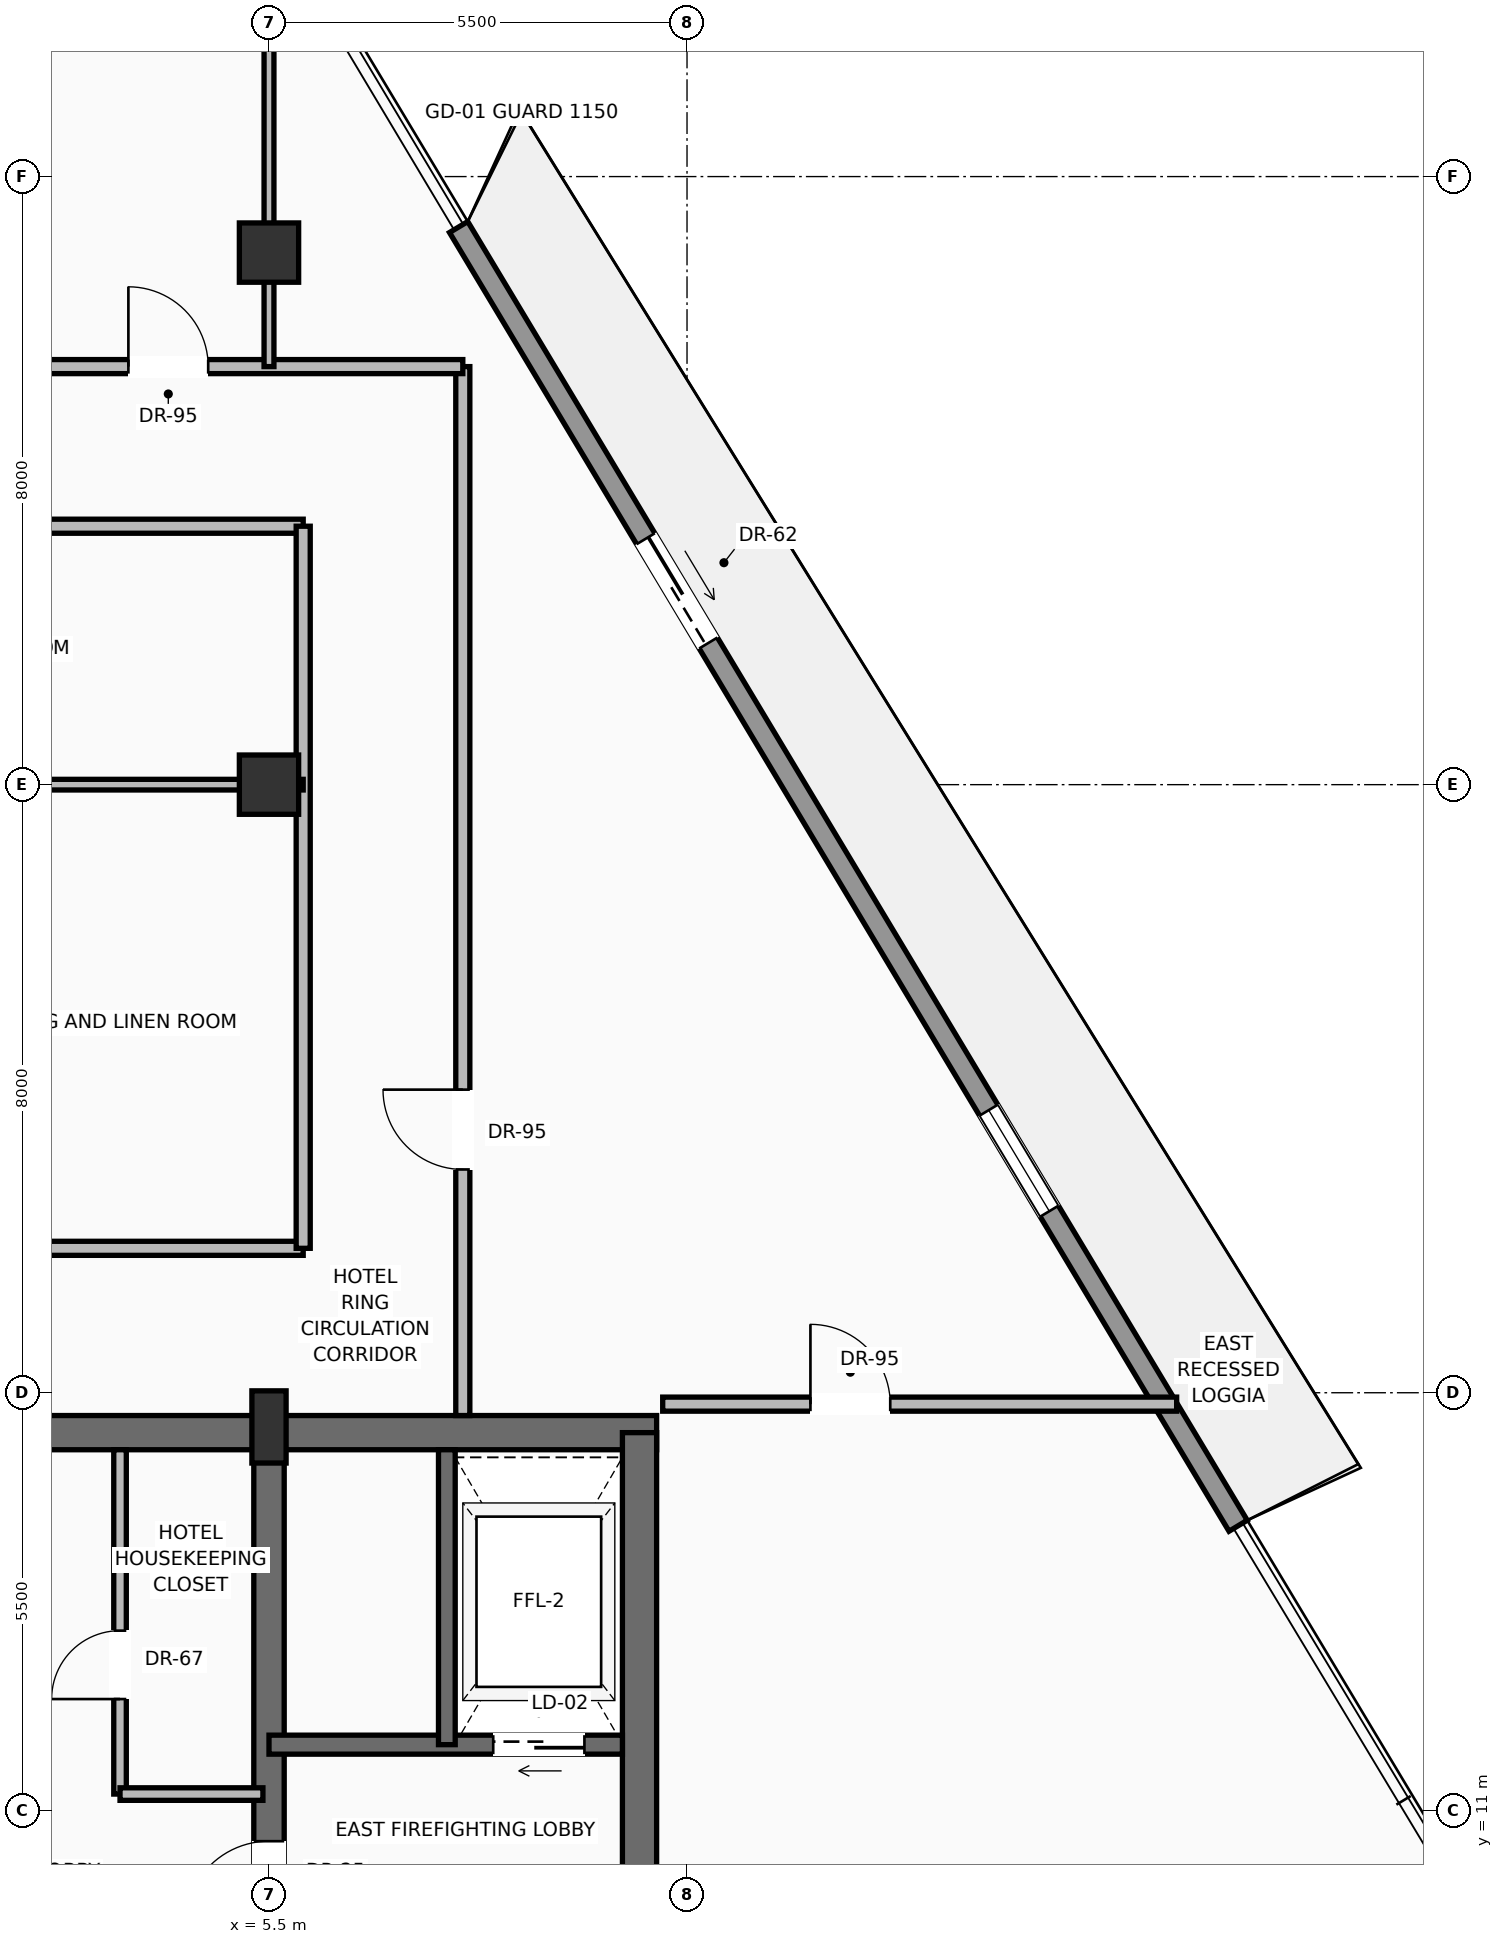
"""IFC4 building model, lengths in metres.
Left out: names, types, materials, properties, quantities, classifications, styles, units other than length and angle.
Written with IfcOpenShell. Run it as: python <this file> out.ifc"""

import sys

from ifc_helpers import new_model, si_unit, direction, frame, frame_2d, origin, origin_2d, place, context, subcontext, project, spatial, rectangle, extrude, source, transform, mapped, element, fill, save


model = new_model("IFC4")
c1 = context("Model", 3, precision=1e-05, world=origin(), true_north=direction((0.0, 1.0)))
c2 = subcontext(c1, "Body", "Model", "MODEL_VIEW")
j1 = project(units=[si_unit("LENGTHUNIT", "METRE"), si_unit("PLANEANGLEUNIT", "RADIAN")], contexts=[c1])
p1 = place(None, origin())
s1 = spatial("IfcSite", under=j1, at=p1, CompositionType="ELEMENT")
p2 = place(p1, origin())
s2 = spatial("IfcBuilding", under=s1, at=p2, CompositionType="ELEMENT")
p3 = place(p2, frame((0.0, 0.0, 266.1)))
s3 = spatial("IfcBuildingStorey", under=s2, at=p3, CompositionType="ELEMENT", Elevation=266.1)
p4 = place(p3, frame((-10.6, 15.975, 0.0), z_axis=(0.0, 0.0, 1.0), x_axis=(1.0, 0.0, 0.0)))
e1 = element("IfcWall", 1, at=p4, inside=s3, PredefinedType="SHEAR", context=c2, shape_type="SweptSolid", body=[
    extrude(rectangle(XDim=21.2, YDim=0.45, at=frame_2d((10.6, 0.0))), origin(), (0.0, 0.0, 1.0), 3.24),
])
p5 = place(p4, frame((3.17, 0.0, 0.0)))
e2 = element("IfcOpeningElement", 2, at=p5, cuts=e1, PredefinedType="OPENING", context=c2, shape_type="SweptSolid", body=[
    extrude(rectangle(XDim=1.3, YDim=2.3, at=frame_2d((0.65, 1.15))), frame((0.0, 0.235, 0.0), z_axis=(0.0, -1.0, 0.0), x_axis=(1.0, 0.0, 0.0)), (0.0, 0.0, 1.0), 0.47),
])
p6 = place(p4, frame((9.6, 0.0, 0.0)))
e3 = element("IfcOpeningElement", 3, at=p6, cuts=e1, PredefinedType="OPENING", context=c2, shape_type="SweptSolid", body=[
    extrude(rectangle(XDim=2.0, YDim=2.4, at=frame_2d((1.0, 1.2))), frame((0.0, 0.235, 0.0), z_axis=(0.0, -1.0, 0.0), x_axis=(1.0, 0.0, 0.0)), (0.0, 0.0, 1.0), 0.47),
])
p7 = place(p3, frame((10.375, 0.625, 0.0), z_axis=(0.0, 0.0, 1.0), x_axis=(0.0, 1.0, 0.0)))
e4 = element("IfcWall", 4, at=p7, inside=s3, PredefinedType="SHEAR", context=c2, shape_type="SweptSolid", body=[
    extrude(rectangle(XDim=15.35, YDim=0.45, at=frame_2d((7.675, 0.0))), origin(), (0.0, 0.0, 1.0), 3.24),
])
p8 = place(p3, frame((5.5, 0.625, 0.0), z_axis=(0.0, 0.0, 1.0), x_axis=(0.0, 1.0, 0.0)))
e5 = element("IfcWall", 5, at=p8, inside=s3, PredefinedType="SHEAR", context=c2, shape_type="SweptSolid", body=[
    extrude(rectangle(XDim=15.35, YDim=0.4, at=frame_2d((7.675, 0.0))), origin(), (0.0, 0.0, 1.0), 3.24),
])
p9 = place(p8, frame((8.875, 0.0, 0.0)))
e6 = element("IfcOpeningElement", 6, at=p9, cuts=e5, PredefinedType="OPENING", context=c2, shape_type="SweptSolid", body=[
    extrude(rectangle(XDim=1.1, YDim=2.2, at=frame_2d((0.55, 1.1))), frame((0.0, 0.21, 0.0), z_axis=(0.0, -1.0, 0.0), x_axis=(1.0, 0.0, 0.0)), (0.0, 0.0, 1.0), 0.42),
])
m1 = source(origin(), c2, "Body", "SweptSolid", [
    extrude(rectangle(XDim=0.45, YDim=0.95, at=origin_2d()), origin(), (0.0, 0.0, 1.0), 3.45),
])
p10 = place(p3, frame((5.5, 16.05, 0.0), z_axis=(0.0, 0.0, 1.0), x_axis=(1.0, 0.0, 0.0)))
e7 = element("IfcColumn", 7, at=p10, inside=s3, PredefinedType="PILASTER", context=c2, shape_type="MappedRepresentation", body=[
    mapped(m1, transform((0.0, 0.0, 0.0), scale=1.0)),
])
m2 = source(origin(), c2, "Body", "SweptSolid", [
    extrude(rectangle(XDim=0.78, YDim=0.78, at=origin_2d()), origin(), (0.0, 0.0, 1.0), 3.45),
])
for number, where, z_axis, x_axis in (
    (8, (5.5, 24.5, 0.0), (0.0, 0.0, 1.0), (1.0, 0.0, 0.0)),
    (9, (5.5, 31.5, 0.0), (0.0, 0.0, 1.0), (1.0, 0.0, 0.0)),
):
    element("IfcColumn", number, at=place(p3, frame(where, z_axis=z_axis, x_axis=x_axis)), inside=s3, PredefinedType="COLUMN", context=c2, shape_type="MappedRepresentation", body=[
        mapped(m2, transform((0.0, 0.0, 0.0), scale=1.0)),
    ])
p11 = place(p3, frame((7.995, 31.836, 0.0), z_axis=(0.0, 0.0, 1.0), x_axis=(0.514643481436, -0.8574042728, 0.0)))
e10 = element("IfcWall", 10, at=p11, inside=s3, PredefinedType="SOLIDWALL", context=c2, shape_type="SweptSolid", body=[
    extrude(rectangle(XDim=19.928, YDim=0.28, at=frame_2d((9.964, 0.0))), origin(), (0.0, 0.0, 1.0), 2.82),
])
p12 = place(p11, frame((4.783, 0.0, 0.0)))
e11 = element("IfcOpeningElement", 11, at=p12, cuts=e10, PredefinedType="OPENING", context=c2, shape_type="SweptSolid", body=[
    extrude(rectangle(XDim=1.6, YDim=2.35, at=frame_2d((0.8, 1.175))), frame((0.0, 0.15, 0.0), z_axis=(0.0, -1.0, 0.0), x_axis=(1.0, 0.0, 0.0)), (0.0, 0.0, 1.0), 0.3),
])
p13 = place(p11, frame((13.551, 0.0, 0.9)))
e12 = element("IfcOpeningElement", 12, at=p13, cuts=e10, PredefinedType="OPENING", context=c2, shape_type="SweptSolid", body=[
    extrude(rectangle(XDim=1.55, YDim=1.75, at=frame_2d((0.775, 0.875))), frame((0.0, 0.15, 0.0), z_axis=(0.0, -1.0, 0.0), x_axis=(1.0, 0.0, 0.0)), (0.0, 0.0, 1.0), 0.3),
])
p14 = place(p3, frame((10.15, 11.87, 0.0), z_axis=(0.0, 0.0, 1.0), x_axis=(-1.0, 0.0, 0.0)))
e13 = element("IfcWall", 13, at=p14, inside=s3, PredefinedType="SOLIDWALL", context=c2, shape_type="SweptSolid", body=[
    extrude(rectangle(XDim=4.65, YDim=0.25, at=frame_2d((2.325, 0.0))), origin(), (0.0, 0.0, 1.0), 3.24),
])
p15 = place(p14, frame((0.5, 0.0, 0.0)))
e14 = element("IfcOpeningElement", 14, at=p15, cuts=e13, PredefinedType="OPENING", context=c2, shape_type="SweptSolid", body=[
    extrude(rectangle(XDim=1.2, YDim=2.25, at=frame_2d((0.6, 1.125))), frame((0.0, 0.135, 0.0), z_axis=(0.0, -1.0, 0.0), x_axis=(1.0, 0.0, 0.0)), (0.0, 0.0, 1.0), 0.27),
])
p16 = place(p3, frame((7.84, 11.87, 0.0), z_axis=(0.0, 0.0, 1.0), x_axis=(0.0, 1.0, 0.0)))
e15 = element("IfcWall", 15, at=p16, inside=s3, PredefinedType="SOLIDWALL", context=c2, shape_type="SweptSolid", body=[
    extrude(rectangle(XDim=3.88, YDim=0.22, at=frame_2d((1.94, 0.0))), origin(), (0.0, 0.0, 1.0), 3.24),
])
p17 = place(p3, frame((3.54, 11.22, 0.0), z_axis=(0.0, 0.0, 1.0), x_axis=(0.0, 1.0, 0.0)))
e16 = element("IfcWall", 16, at=p17, inside=s3, PredefinedType="PARTITIONING", context=c2, shape_type="SweptSolid", body=[
    extrude(rectangle(XDim=4.53, YDim=0.165, at=frame_2d((2.265, 0.0))), origin(), (0.0, 0.0, 1.0), 3.232),
])
p18 = place(p17, frame((1.25, 0.0, 0.0)))
e17 = element("IfcOpeningElement", 17, at=p18, cuts=e16, PredefinedType="OPENING", context=c2, shape_type="SweptSolid", body=[
    extrude(rectangle(XDim=0.9, YDim=2.1, at=frame_2d((0.45, 1.05))), frame((0.0, 0.093, 0.0), z_axis=(0.0, -1.0, 0.0), x_axis=(1.0, 0.0, 0.0)), (0.0, 0.0, 1.0), 0.185),
])
p19 = place(p3, frame((3.54, 11.22, 0.0), z_axis=(0.0, 0.0, 1.0), x_axis=(1.0, 0.0, 0.0)))
e18 = element("IfcWall", 18, at=p19, inside=s3, PredefinedType="PARTITIONING", context=c2, shape_type="SweptSolid", body=[
    extrude(rectangle(XDim=1.88, YDim=0.165, at=frame_2d((0.94, 0.0))), origin(), (0.0, 0.0, 1.0), 3.232),
])
p20 = place(p3, frame((-6.5, 18.4, 0.0), z_axis=(0.0, 0.0, 1.0), x_axis=(1.0, 0.0, 0.0)))
e19 = element("IfcWall", 19, at=p20, inside=s3, PredefinedType="PARTITIONING", context=c2, shape_type="SweptSolid", body=[
    extrude(rectangle(XDim=12.45, YDim=0.185, at=frame_2d((6.225, 0.0))), origin(), (0.0, 0.0, 1.0), 3.232),
])
p21 = place(p20, frame((5.75, 0.0, 0.0)))
e20 = element("IfcOpeningElement", 20, at=p21, cuts=e19, PredefinedType="OPENING", context=c2, shape_type="SweptSolid", body=[
    extrude(rectangle(XDim=0.95, YDim=2.2, at=frame_2d((0.475, 1.1))), frame((0.0, 0.103, 0.0), z_axis=(0.0, -1.0, 0.0), x_axis=(1.0, 0.0, 0.0)), (0.0, 0.0, 1.0), 0.205),
])
p22 = place(p3, frame((-6.5, 27.9, 0.0), z_axis=(0.0, 0.0, 1.0), x_axis=(1.0, 0.0, 0.0)))
e21 = element("IfcWall", 21, at=p22, inside=s3, PredefinedType="PARTITIONING", context=c2, shape_type="SweptSolid", body=[
    extrude(rectangle(XDim=12.45, YDim=0.185, at=frame_2d((6.225, 0.0))), origin(), (0.0, 0.0, 1.0), 2.885),
])
p23 = place(p22, frame((5.75, 0.0, 0.0)))
e22 = element("IfcOpeningElement", 22, at=p23, cuts=e21, PredefinedType="OPENING", context=c2, shape_type="SweptSolid", body=[
    extrude(rectangle(XDim=0.95, YDim=2.2, at=frame_2d((0.475, 1.1))), frame((0.0, 0.103, 0.0), z_axis=(0.0, -1.0, 0.0), x_axis=(1.0, 0.0, 0.0)), (0.0, 0.0, 1.0), 0.205),
])
p24 = place(p3, frame((5.95, 18.4, 0.0), z_axis=(0.0, 0.0, 1.0), x_axis=(0.0, 1.0, 0.0)))
e23 = element("IfcWall", 23, at=p24, inside=s3, PredefinedType="PARTITIONING", context=c2, shape_type="SweptSolid", body=[
    extrude(rectangle(XDim=9.5, YDim=0.185, at=frame_2d((4.75, 0.0))), origin(), (0.0, 0.0, 1.0), 3.232),
])
p25 = place(p3, frame((8.05, 16.2, 0.0), z_axis=(0.0, 0.0, 1.0), x_axis=(0.0, 1.0, 0.0)))
e24 = element("IfcWall", 24, at=p25, inside=s3, PredefinedType="PARTITIONING", context=c2, shape_type="SweptSolid", body=[
    extrude(rectangle(XDim=13.8, YDim=0.185, at=frame_2d((6.9, 0.0))), origin(), (0.0, 0.0, 1.0), 3.232),
])
p26 = place(p25, frame((3.238, 0.0, 0.0)))
e25 = element("IfcOpeningElement", 25, at=p26, cuts=e24, PredefinedType="OPENING", context=c2, shape_type="SweptSolid", body=[
    extrude(rectangle(XDim=1.05, YDim=2.25, at=frame_2d((0.525, 1.125))), frame((0.0, 0.103, 0.0), z_axis=(0.0, -1.0, 0.0), x_axis=(1.0, 0.0, 0.0)), (0.0, 0.0, 1.0), 0.205),
])
p27 = place(p3, frame((-8.6, 30.0, 0.0), z_axis=(0.0, 0.0, 1.0), x_axis=(1.0, 0.0, 0.0)))
e26 = element("IfcWall", 26, at=p27, inside=s3, PredefinedType="PARTITIONING", context=c2, shape_type="SweptSolid", body=[
    extrude(rectangle(XDim=16.65, YDim=0.185, at=frame_2d((8.325, 0.0))), origin(), (0.0, 0.0, 1.0), 3.232),
])
p28 = place(p27, frame((3.9, 0.0, 0.0)))
e27 = element("IfcOpeningElement", 27, at=p28, cuts=e26, PredefinedType="OPENING", context=c2, shape_type="SweptSolid", body=[
    extrude(rectangle(XDim=1.05, YDim=2.25, at=frame_2d((0.525, 1.125))), frame((0.0, 0.103, 0.0), z_axis=(0.0, -1.0, 0.0), x_axis=(1.0, 0.0, 0.0)), (0.0, 0.0, 1.0), 0.205),
])
p29 = place(p27, frame((7.8, 0.0, 0.0)))
e28 = element("IfcOpeningElement", 28, at=p29, cuts=e26, PredefinedType="OPENING", context=c2, shape_type="SweptSolid", body=[
    extrude(rectangle(XDim=1.05, YDim=2.25, at=frame_2d((0.525, 1.125))), frame((0.0, 0.103, 0.0), z_axis=(0.0, -1.0, 0.0), x_axis=(1.0, 0.0, 0.0)), (0.0, 0.0, 1.0), 0.205),
])
p30 = place(p27, frame((12.25, 0.0, 0.0)))
e29 = element("IfcOpeningElement", 29, at=p30, cuts=e26, PredefinedType="OPENING", context=c2, shape_type="SweptSolid", body=[
    extrude(rectangle(XDim=1.05, YDim=2.25, at=frame_2d((0.525, 1.125))), frame((0.0, 0.103, 0.0), z_axis=(0.0, -1.0, 0.0), x_axis=(1.0, 0.0, 0.0)), (0.0, 0.0, 1.0), 0.205),
])
p31 = place(p3, frame((-6.5, 24.5, 0.0), z_axis=(0.0, 0.0, 1.0), x_axis=(1.0, 0.0, 0.0)))
e30 = element("IfcWall", 30, at=p31, inside=s3, PredefinedType="PARTITIONING", context=c2, shape_type="SweptSolid", body=[
    extrude(rectangle(XDim=12.45, YDim=0.14, at=frame_2d((6.225, 0.0))), origin(), (0.0, 0.0, 1.0), 2.683),
])
p32 = place(p3, frame((10.68, 16.35, 0.0), z_axis=(0.0, 0.0, 1.0), x_axis=(1.0, 0.0, 0.0)))
e31 = element("IfcWall", 31, at=p32, inside=s3, PredefinedType="PARTITIONING", context=c2, shape_type="SweptSolid", body=[
    extrude(rectangle(XDim=6.762, YDim=0.185, at=frame_2d((3.381, 0.0))), origin(), (0.0, 0.0, 1.0), 3.232),
])
p33 = place(p32, frame((1.944, 0.0, 0.0)))
e32 = element("IfcOpeningElement", 32, at=p33, cuts=e31, PredefinedType="OPENING", context=c2, shape_type="SweptSolid", body=[
    extrude(rectangle(XDim=1.05, YDim=2.25, at=frame_2d((0.525, 1.125))), frame((0.0, 0.103, 0.0), z_axis=(0.0, -1.0, 0.0), x_axis=(1.0, 0.0, 0.0)), (0.0, 0.0, 1.0), 0.205),
])
p34 = place(p3, frame((5.5, 30.0, 0.0), z_axis=(0.0, 0.0, 1.0), x_axis=(0.0, 1.0, 0.0)))
e33 = element("IfcWall", 33, at=p34, inside=s3, PredefinedType="PARTITIONING", context=c2, shape_type="SweptSolid", body=[
    extrude(rectangle(XDim=6.246, YDim=0.13, at=frame_2d((3.123, 0.0))), origin(), (0.0, 0.0, 1.0), 2.683),
])
m3 = source(origin(), c2, "Body", "SweptSolid", [
    extrude(rectangle(XDim=1.6, YDim=2.35, at=frame_2d((0.8, 1.175))), frame((0.0, 0.025, 0.0), z_axis=(0.0, -1.0, 0.0), x_axis=(1.0, 0.0, 0.0)), (0.0, 0.0, 1.0), 0.05),
])
p35 = place(p12, origin())
e34 = element("IfcDoor", 34, at=p35, inside=s3, OperationType="SLIDING_TO_RIGHT", PredefinedType="DOOR", context=c2, shape_type="MappedRepresentation", body=[
    mapped(m3, transform((0.0, 0.0, 0.0), scale=1.0)),
])
fill(e11, e34)
m4 = source(origin(), c2, "Body", "SweptSolid", [
    extrude(rectangle(XDim=1.55, YDim=1.75, at=frame_2d((0.775, 0.875))), frame((0.0, 0.03, 0.0), z_axis=(0.0, -1.0, 0.0), x_axis=(1.0, 0.0, 0.0)), (0.0, 0.0, 1.0), 0.06),
])
p36 = place(p13, origin())
e35 = element("IfcWindow", 35, at=p36, inside=s3, PartitioningType="SINGLE_PANEL", PredefinedType="WINDOW", context=c2, shape_type="MappedRepresentation", body=[
    mapped(m4, transform((0.0, 0.0, 0.0), scale=1.0)),
])
fill(e12, e35)
m5 = source(origin(), c2, "Body", "SweptSolid", [
    extrude(rectangle(XDim=1.1, YDim=2.2, at=frame_2d((0.55, 1.1))), frame((0.0, 0.025, 0.0), z_axis=(0.0, -1.0, 0.0), x_axis=(1.0, 0.0, 0.0)), (0.0, 0.0, 1.0), 0.05),
])
p37 = place(p9, origin())
e36 = element("IfcDoor", 36, at=p37, inside=s3, OperationType="SINGLE_SWING_LEFT", PredefinedType="DOOR", context=c2, shape_type="MappedRepresentation", body=[
    mapped(m5, transform((0.0, 0.0, 0.0), scale=1.0)),
])
fill(e6, e36)
m6 = source(origin(), c2, "Body", "SweptSolid", [
    extrude(rectangle(XDim=1.2, YDim=2.25, at=frame_2d((0.6, 1.125))), frame((0.0, 0.025, 0.0), z_axis=(0.0, -1.0, 0.0), x_axis=(1.0, 0.0, 0.0)), (0.0, 0.0, 1.0), 0.05),
])
p38 = place(p15, origin())
e37 = element("IfcDoor", 37, at=p38, inside=s3, OperationType="SLIDING_TO_RIGHT", PredefinedType="DOOR", context=c2, shape_type="MappedRepresentation", body=[
    mapped(m6, transform((0.0, 0.0, 0.0), scale=1.0)),
])
fill(e14, e37)
m7 = source(origin(), c2, "Body", "SweptSolid", [
    extrude(rectangle(XDim=0.9, YDim=2.1, at=frame_2d((0.45, 1.05))), frame((0.0, 0.025, 0.0), z_axis=(0.0, -1.0, 0.0), x_axis=(1.0, 0.0, 0.0)), (0.0, 0.0, 1.0), 0.05),
])
p39 = place(p18, origin())
e38 = element("IfcDoor", 38, at=p39, inside=s3, OperationType="SINGLE_SWING_LEFT", PredefinedType="DOOR", context=c2, shape_type="MappedRepresentation", body=[
    mapped(m7, transform((0.0, 0.0, 0.0), scale=1.0)),
])
fill(e17, e38)
m8 = source(origin(), c2, "Body", "SweptSolid", [
    extrude(rectangle(XDim=1.05, YDim=2.25, at=frame_2d((0.525, 1.125))), frame((0.0, 0.025, 0.0), z_axis=(0.0, -1.0, 0.0), x_axis=(1.0, 0.0, 0.0)), (0.0, 0.0, 1.0), 0.05),
])
p40 = place(p33, origin())
e39 = element("IfcDoor", 39, at=p40, inside=s3, OperationType="SINGLE_SWING_LEFT", PredefinedType="DOOR", context=c2, shape_type="MappedRepresentation", body=[
    mapped(m8, transform((0.0, 0.0, 0.0), scale=1.0)),
])
fill(e32, e39)
p41 = place(p26, origin())
e40 = element("IfcDoor", 40, at=p41, inside=s3, OperationType="SINGLE_SWING_RIGHT", PredefinedType="DOOR", context=c2, shape_type="MappedRepresentation", body=[
    mapped(m8, transform((0.0, 0.0, 0.0), scale=1.0)),
])
fill(e25, e40)
p42 = place(p30, origin())
e41 = element("IfcDoor", 41, at=p42, inside=s3, OperationType="SINGLE_SWING_LEFT", PredefinedType="DOOR", context=c2, shape_type="MappedRepresentation", body=[
    mapped(m8, transform((0.0, 0.0, 0.0), scale=1.0)),
])
fill(e29, e41)
save(model, sys.argv[1])
